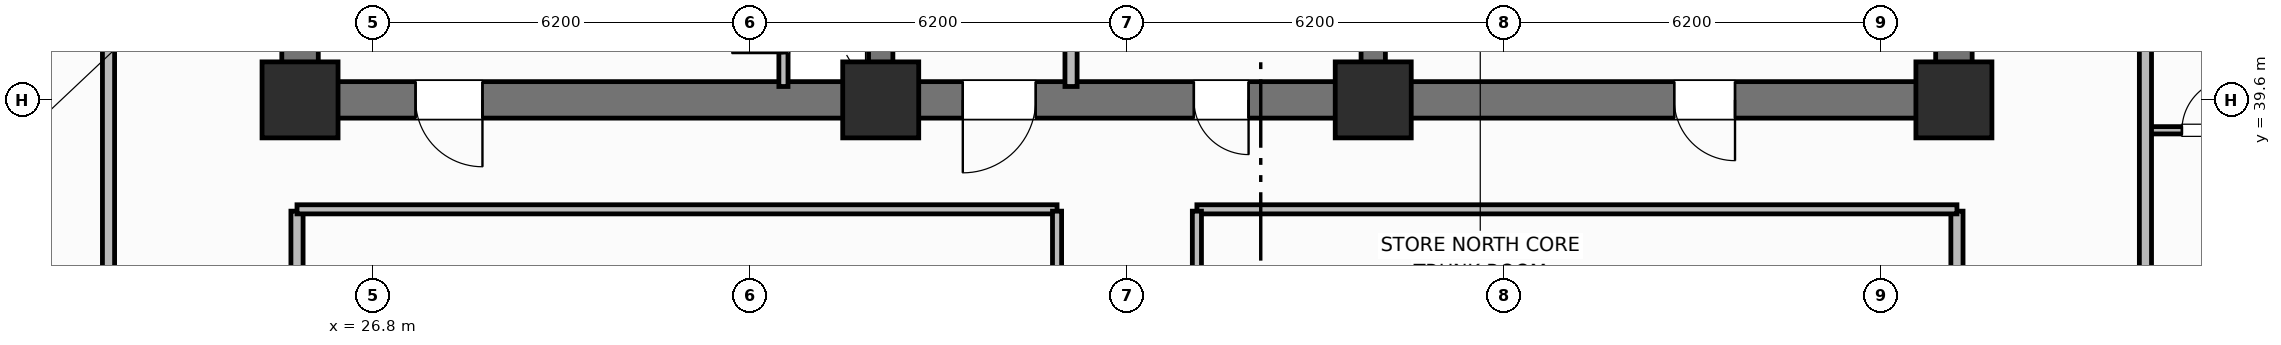
"""IFC4 building model, lengths in metres.
Left out: names, types, materials, properties, quantities, classifications, styles, units other than length and angle.
Written with IfcOpenShell. Run it as: python <this file> out.ifc"""

import sys

from ifc_helpers import new_model, si_unit, direction, frame, frame_2d, origin, origin_2d, place, context, subcontext, project, spatial, rectangle, extrude, element, fill, save


model = new_model("IFC4")
c1 = context("Model", 3, precision=1e-05, world=origin(), true_north=direction((0.0, 1.0)))
c2 = subcontext(c1, "Body", "Model", "MODEL_VIEW")
j1 = project(units=[si_unit("LENGTHUNIT", "METRE"), si_unit("PLANEANGLEUNIT", "RADIAN")], contexts=[c1])
p1 = place(None, origin())
s1 = spatial("IfcSite", under=j1, at=p1, CompositionType="ELEMENT")
p2 = place(p1, origin())
s2 = spatial("IfcBuilding", under=s1, at=p2, CompositionType="ELEMENT")
p3 = place(p2, frame((0.0, 0.0, 32.5)))
s3 = spatial("IfcBuildingStorey", under=s2, at=p3, CompositionType="ELEMENT", Elevation=32.5)
for number, where, z_axis, x_axis in (
    (1, (25.6, 39.9, 0.0), (0.0, 0.0, 1.0), (0.0, 1.0, 0.0)),
    (2, (52.8, 39.9, 0.0), (0.0, 0.0, 1.0), (0.0, 1.0, 0.0)),
):
    element("IfcWall", number, at=place(p3, frame(where, z_axis=z_axis, x_axis=x_axis)), inside=s3, PredefinedType="SHEAR", context=c2, shape_type="SweptSolid", body=[
        extrude(rectangle(XDim=5.6, YDim=0.6, at=frame_2d((2.8, 0.0))), origin(), (0.0, 0.0, 1.0), 3.7),
    ])
p4 = place(p3, frame((52.8, 39.6, 0.0), z_axis=(0.0, 0.0, 1.0), x_axis=(-1.0, 0.0, 0.0)))
e3 = element("IfcWall", 3, at=p4, inside=s3, PredefinedType="SHEAR", context=c2, shape_type="SweptSolid", body=[
    extrude(rectangle(XDim=27.2, YDim=0.6, at=frame_2d((13.6, 0.0))), origin(), (0.0, 0.0, 1.0), 3.7),
])
p5 = place(p4, frame((24.2, 0.0, 0.0)))
e4 = element("IfcOpeningElement", 4, at=p5, cuts=e3, PredefinedType="OPENING", context=c2, shape_type="SweptSolid", body=[
    extrude(rectangle(XDim=1.1, YDim=2.15, at=frame_2d((0.55, 1.075))), frame((0.0, 0.31, 0.0), z_axis=(0.0, -1.0, 0.0), x_axis=(1.0, 0.0, 0.0)), (0.0, 0.0, 1.0), 0.62),
])
p6 = place(p4, frame((15.1, 0.0, 0.0)))
e5 = element("IfcOpeningElement", 5, at=p6, cuts=e3, PredefinedType="OPENING", context=c2, shape_type="SweptSolid", body=[
    extrude(rectangle(XDim=1.2, YDim=2.15, at=frame_2d((0.6, 1.075))), frame((0.0, 0.31, 0.0), z_axis=(0.0, -1.0, 0.0), x_axis=(1.0, 0.0, 0.0)), (0.0, 0.0, 1.0), 0.62),
])
p7 = place(p4, frame((11.6, 0.0, 0.0)))
e6 = element("IfcOpeningElement", 6, at=p7, cuts=e3, PredefinedType="OPENING", context=c2, shape_type="SweptSolid", body=[
    extrude(rectangle(XDim=0.9, YDim=2.1, at=frame_2d((0.45, 1.05))), frame((0.0, 0.31, 0.0), z_axis=(0.0, -1.0, 0.0), x_axis=(1.0, 0.0, 0.0)), (0.0, 0.0, 1.0), 0.62),
])
p8 = place(p4, frame((3.6, 0.0, 0.0)))
e7 = element("IfcOpeningElement", 7, at=p8, cuts=e3, PredefinedType="OPENING", context=c2, shape_type="SweptSolid", body=[
    extrude(rectangle(XDim=1.0, YDim=2.15, at=frame_2d((0.5, 1.075))), frame((0.0, 0.31, 0.0), z_axis=(0.0, -1.0, 0.0), x_axis=(1.0, 0.0, 0.0)), (0.0, 0.0, 1.0), 0.62),
])
for number, where, z_axis, x_axis in (
    (8, (35.15, 39.9, 0.0), (0.0, 0.0, 1.0), (0.0, 1.0, 0.0)),
    (9, (43.25, 39.9, 0.0), (0.0, 0.0, 1.0), (0.0, 1.0, 0.0)),
):
    element("IfcWall", number, at=place(p3, frame(where, z_axis=z_axis, x_axis=x_axis)), inside=s3, PredefinedType="SHEAR", context=c2, shape_type="SweptSolid", body=[
        extrude(rectangle(XDim=5.6, YDim=0.4, at=frame_2d((2.8, 0.0))), origin(), (0.0, 0.0, 1.0), 3.7),
    ])
for number, where, z_axis, x_axis in (
    (10, (25.6, 39.6, 0.0), (0.0, 0.0, 1.0), (1.0, 0.0, 0.0)),
    (11, (35.15, 39.6, 0.0), (0.0, 0.0, 1.0), (1.0, 0.0, 0.0)),
    (12, (43.25, 39.6, 0.0), (0.0, 0.0, 1.0), (1.0, 0.0, 0.0)),
    (13, (52.8, 39.6, 0.0), (0.0, 0.0, 1.0), (1.0, 0.0, 0.0)),
):
    element("IfcColumn", number, at=place(p3, frame(where, z_axis=z_axis, x_axis=x_axis)), inside=s3, PredefinedType="COLUMN", context=c2, shape_type="SweptSolid", body=[
        extrude(rectangle(XDim=1.25, YDim=1.25, at=origin_2d()), origin(), (0.0, 0.0, 1.0), 3.7),
    ])
p9 = place(p3, frame((33.55, 39.82, 0.0), z_axis=(0.0, 0.0, 1.0), x_axis=(0.0, 1.0, 0.0)))
e14 = element("IfcWall", 14, at=p9, inside=s3, PredefinedType="PARTITIONING", context=c2, shape_type="SweptSolid", body=[
    extrude(rectangle(XDim=2.13, YDim=0.15, at=frame_2d((1.065, 0.0))), origin(), (0.0, 0.0, 1.0), 2.53),
])
p10 = place(p9, frame((0.55, 0.0, 0.0)))
e15 = element("IfcOpeningElement", 15, at=p10, cuts=e14, PredefinedType="OPENING", context=c2, shape_type="SweptSolid", body=[
    extrude(rectangle(XDim=0.85, YDim=2.05, at=frame_2d((0.425, 1.025))), frame((0.0, 0.085, 0.0), z_axis=(0.0, -1.0, 0.0), x_axis=(1.0, 0.0, 0.0)), (0.0, 0.0, 1.0), 0.17),
])
p11 = place(p3, frame((38.28, 39.82, 0.0), z_axis=(0.0, 0.0, 1.0), x_axis=(0.0, 1.0, 0.0)))
e16 = element("IfcWall", 16, at=p11, inside=s3, PredefinedType="PARTITIONING", context=c2, shape_type="SweptSolid", body=[
    extrude(rectangle(XDim=2.73, YDim=0.2, at=frame_2d((1.365, 0.0))), origin(), (0.0, 0.0, 1.0), 2.53),
])
for number, where, z_axis, x_axis in (
    (17, (25.55, 18.63, 0.0), (0.0, 0.0, 1.0), (0.0, 1.0, 0.0)),
    (18, (52.85, 18.63, 0.0), (0.0, 0.0, 1.0), (0.0, 1.0, 0.0)),
):
    element("IfcWall", number, at=place(p3, frame(where, z_axis=z_axis, x_axis=x_axis)), inside=s3, PredefinedType="PARTITIONING", context=c2, shape_type="SweptSolid", body=[
        extrude(rectangle(XDim=19.14, YDim=0.2, at=frame_2d((9.57, 0.0))), origin(), (0.0, 0.0, 1.0), 2.53),
    ])
for number, where, z_axis, x_axis in (
    (19, (25.55, 37.8, 0.0), (0.0, 0.0, 1.0), (1.0, 0.0, 0.0)),
    (20, (40.35, 37.8, 0.0), (0.0, 0.0, 1.0), (1.0, 0.0, 0.0)),
):
    element("IfcWall", number, at=place(p3, frame(where, z_axis=z_axis, x_axis=x_axis)), inside=s3, PredefinedType="PARTITIONING", context=c2, shape_type="SweptSolid", body=[
        extrude(rectangle(XDim=12.5, YDim=0.15, at=frame_2d((6.25, 0.0))), origin(), (0.0, 0.0, 1.0), 2.53),
    ])
p12 = place(p3, frame((38.05, 18.63, 0.0), z_axis=(0.0, 0.0, 1.0), x_axis=(0.0, 1.0, 0.0)))
e21 = element("IfcWall", 21, at=p12, inside=s3, PredefinedType="PARTITIONING", context=c2, shape_type="SweptSolid", body=[
    extrude(rectangle(XDim=19.14, YDim=0.15, at=frame_2d((9.57, 0.0))), origin(), (0.0, 0.0, 1.0), 2.53),
])
p13 = place(p12, frame((5.5, 0.0, 0.0)))
e22 = element("IfcOpeningElement", 22, at=p13, cuts=e21, PredefinedType="OPENING", context=c2, shape_type="SweptSolid", body=[
    extrude(rectangle(XDim=1.0, YDim=2.15, at=frame_2d((0.5, 1.075))), frame((0.0, 0.085, 0.0), z_axis=(0.0, -1.0, 0.0), x_axis=(1.0, 0.0, 0.0)), (0.0, 0.0, 1.0), 0.17),
])
p14 = place(p3, frame((40.35, 18.63, 0.0), z_axis=(0.0, 0.0, 1.0), x_axis=(0.0, 1.0, 0.0)))
e23 = element("IfcWall", 23, at=p14, inside=s3, PredefinedType="PARTITIONING", context=c2, shape_type="SweptSolid", body=[
    extrude(rectangle(XDim=19.14, YDim=0.15, at=frame_2d((9.57, 0.0))), origin(), (0.0, 0.0, 1.0), 2.53),
])
p15 = place(p14, frame((5.5, 0.0, 0.0)))
e24 = element("IfcOpeningElement", 24, at=p15, cuts=e23, PredefinedType="OPENING", context=c2, shape_type="SweptSolid", body=[
    extrude(rectangle(XDim=1.0, YDim=2.15, at=frame_2d((0.5, 1.075))), frame((0.0, 0.085, 0.0), z_axis=(0.0, -1.0, 0.0), x_axis=(1.0, 0.0, 0.0)), (0.0, 0.0, 1.0), 0.17),
])
p16 = place(p3, frame((22.45, 10.6, 0.0), z_axis=(0.0, 0.0, 1.0), x_axis=(0.0, 1.0, 0.0)))
e25 = element("IfcWall", 25, at=p16, inside=s3, PredefinedType="PARTITIONING", context=c2, shape_type="SweptSolid", body=[
    extrude(rectangle(XDim=35.2, YDim=0.2, at=frame_2d((17.6, 0.0))), origin(), (0.0, 0.0, 1.0), 2.53),
])
p17 = place(p16, frame((2.65, 0.0, 0.0)))
e26 = element("IfcOpeningElement", 26, at=p17, cuts=e25, PredefinedType="OPENING", context=c2, shape_type="SweptSolid", body=[
    extrude(rectangle(XDim=1.0, YDim=2.15, at=frame_2d((0.5, 1.075))), frame((0.0, 0.11, 0.0), z_axis=(0.0, -1.0, 0.0), x_axis=(1.0, 0.0, 0.0)), (0.0, 0.0, 1.0), 0.22),
])
p18 = place(p16, frame((19.95, 0.0, 0.0)))
e27 = element("IfcOpeningElement", 27, at=p18, cuts=e25, PredefinedType="OPENING", context=c2, shape_type="SweptSolid", body=[
    extrude(rectangle(XDim=1.0, YDim=2.15, at=frame_2d((0.5, 1.075))), frame((0.0, 0.11, 0.0), z_axis=(0.0, -1.0, 0.0), x_axis=(1.0, 0.0, 0.0)), (0.0, 0.0, 1.0), 0.22),
])
p19 = place(p3, frame((55.95, 39.1, 0.0), z_axis=(0.0, 0.0, 1.0), x_axis=(1.0, 0.0, 0.0)))
e28 = element("IfcWall", 28, at=p19, inside=s3, PredefinedType="PARTITIONING", context=c2, shape_type="SweptSolid", body=[
    extrude(rectangle(XDim=2.25, YDim=0.12, at=frame_2d((1.125, 0.0))), origin(), (0.0, 0.0, 1.0), 2.53),
])
p20 = place(p19, frame((0.6, 0.0, 0.0)))
e29 = element("IfcOpeningElement", 29, at=p20, cuts=e28, PredefinedType="OPENING", context=c2, shape_type="SweptSolid", body=[
    extrude(rectangle(XDim=0.85, YDim=2.1, at=frame_2d((0.425, 1.05))), frame((0.0, 0.07, 0.0), z_axis=(0.0, -1.0, 0.0), x_axis=(1.0, 0.0, 0.0)), (0.0, 0.0, 1.0), 0.14),
])
p21 = place(p3, frame((55.95, 10.6, 0.0), z_axis=(0.0, 0.0, 1.0), x_axis=(0.0, 1.0, 0.0)))
e30 = element("IfcWall", 30, at=p21, inside=s3, PredefinedType="PARTITIONING", context=c2, shape_type="SweptSolid", body=[
    extrude(rectangle(XDim=35.2, YDim=0.2, at=frame_2d((17.6, 0.0))), origin(), (0.0, 0.0, 1.0), 2.53),
])
p22 = place(p21, frame((2.65, 0.0, 0.0)))
e31 = element("IfcOpeningElement", 31, at=p22, cuts=e30, PredefinedType="OPENING", context=c2, shape_type="SweptSolid", body=[
    extrude(rectangle(XDim=1.0, YDim=2.15, at=frame_2d((0.5, 1.075))), frame((0.0, 0.11, 0.0), z_axis=(0.0, -1.0, 0.0), x_axis=(1.0, 0.0, 0.0)), (0.0, 0.0, 1.0), 0.22),
])
p23 = place(p21, frame((12.518, 0.0, 0.0)))
e32 = element("IfcOpeningElement", 32, at=p23, cuts=e30, PredefinedType="OPENING", context=c2, shape_type="SweptSolid", body=[
    extrude(rectangle(XDim=1.0, YDim=2.15, at=frame_2d((0.5, 1.075))), frame((0.0, 0.11, 0.0), z_axis=(0.0, -1.0, 0.0), x_axis=(1.0, 0.0, 0.0)), (0.0, 0.0, 1.0), 0.22),
])
p24 = place(p21, frame((23.65, 0.0, 0.0)))
e33 = element("IfcOpeningElement", 33, at=p24, cuts=e30, PredefinedType="OPENING", context=c2, shape_type="SweptSolid", body=[
    extrude(rectangle(XDim=1.0, YDim=2.15, at=frame_2d((0.5, 1.075))), frame((0.0, 0.11, 0.0), z_axis=(0.0, -1.0, 0.0), x_axis=(1.0, 0.0, 0.0)), (0.0, 0.0, 1.0), 0.22),
])
p25 = place(p10, origin())
e34 = element("IfcDoor", 34, at=p25, inside=s3, OperationType="SINGLE_SWING_LEFT", PredefinedType="TRAPDOOR", context=c2, shape_type="SweptSolid", body=[
    extrude(rectangle(XDim=0.85, YDim=2.05, at=frame_2d((0.425, 1.025))), frame((0.0, 0.025, 0.0), z_axis=(0.0, -1.0, 0.0), x_axis=(1.0, 0.0, 0.0)), (0.0, 0.0, 1.0), 0.05),
])
fill(e15, e34)
p26 = place(p20, origin())
e35 = element("IfcDoor", 35, at=p26, inside=s3, OperationType="SINGLE_SWING_RIGHT", PredefinedType="DOOR", context=c2, shape_type="SweptSolid", body=[
    extrude(rectangle(XDim=0.85, YDim=2.1, at=frame_2d((0.425, 1.05))), frame((0.0, 0.025, 0.0), z_axis=(0.0, -1.0, 0.0), x_axis=(1.0, 0.0, 0.0)), (0.0, 0.0, 1.0), 0.05),
])
fill(e29, e35)
p27 = place(p5, origin())
e36 = element("IfcDoor", 36, at=p27, inside=s3, OperationType="SINGLE_SWING_LEFT", PredefinedType="DOOR", context=c2, shape_type="SweptSolid", body=[
    extrude(rectangle(XDim=1.1, YDim=2.15, at=frame_2d((0.55, 1.075))), frame((0.0, 0.025, 0.0), z_axis=(0.0, -1.0, 0.0), x_axis=(1.0, 0.0, 0.0)), (0.0, 0.0, 1.0), 0.05),
])
fill(e4, e36)
p28 = place(p6, origin())
e37 = element("IfcDoor", 37, at=p28, inside=s3, OperationType="SINGLE_SWING_RIGHT", PredefinedType="DOOR", context=c2, shape_type="SweptSolid", body=[
    extrude(rectangle(XDim=1.2, YDim=2.15, at=frame_2d((0.6, 1.075))), frame((0.0, 0.025, 0.0), z_axis=(0.0, -1.0, 0.0), x_axis=(1.0, 0.0, 0.0)), (0.0, 0.0, 1.0), 0.05),
])
fill(e5, e37)
p29 = place(p7, origin())
e38 = element("IfcDoor", 38, at=p29, inside=s3, OperationType="SINGLE_SWING_LEFT", PredefinedType="DOOR", context=c2, shape_type="SweptSolid", body=[
    extrude(rectangle(XDim=0.9, YDim=2.1, at=frame_2d((0.45, 1.05))), frame((0.0, 0.025, 0.0), z_axis=(0.0, -1.0, 0.0), x_axis=(1.0, 0.0, 0.0)), (0.0, 0.0, 1.0), 0.05),
])
fill(e6, e38)
p30 = place(p8, origin())
e39 = element("IfcDoor", 39, at=p30, inside=s3, OperationType="SINGLE_SWING_LEFT", PredefinedType="DOOR", context=c2, shape_type="SweptSolid", body=[
    extrude(rectangle(XDim=1.0, YDim=2.15, at=frame_2d((0.5, 1.075))), frame((0.0, 0.025, 0.0), z_axis=(0.0, -1.0, 0.0), x_axis=(1.0, 0.0, 0.0)), (0.0, 0.0, 1.0), 0.05),
])
fill(e7, e39)
save(model, sys.argv[1])
